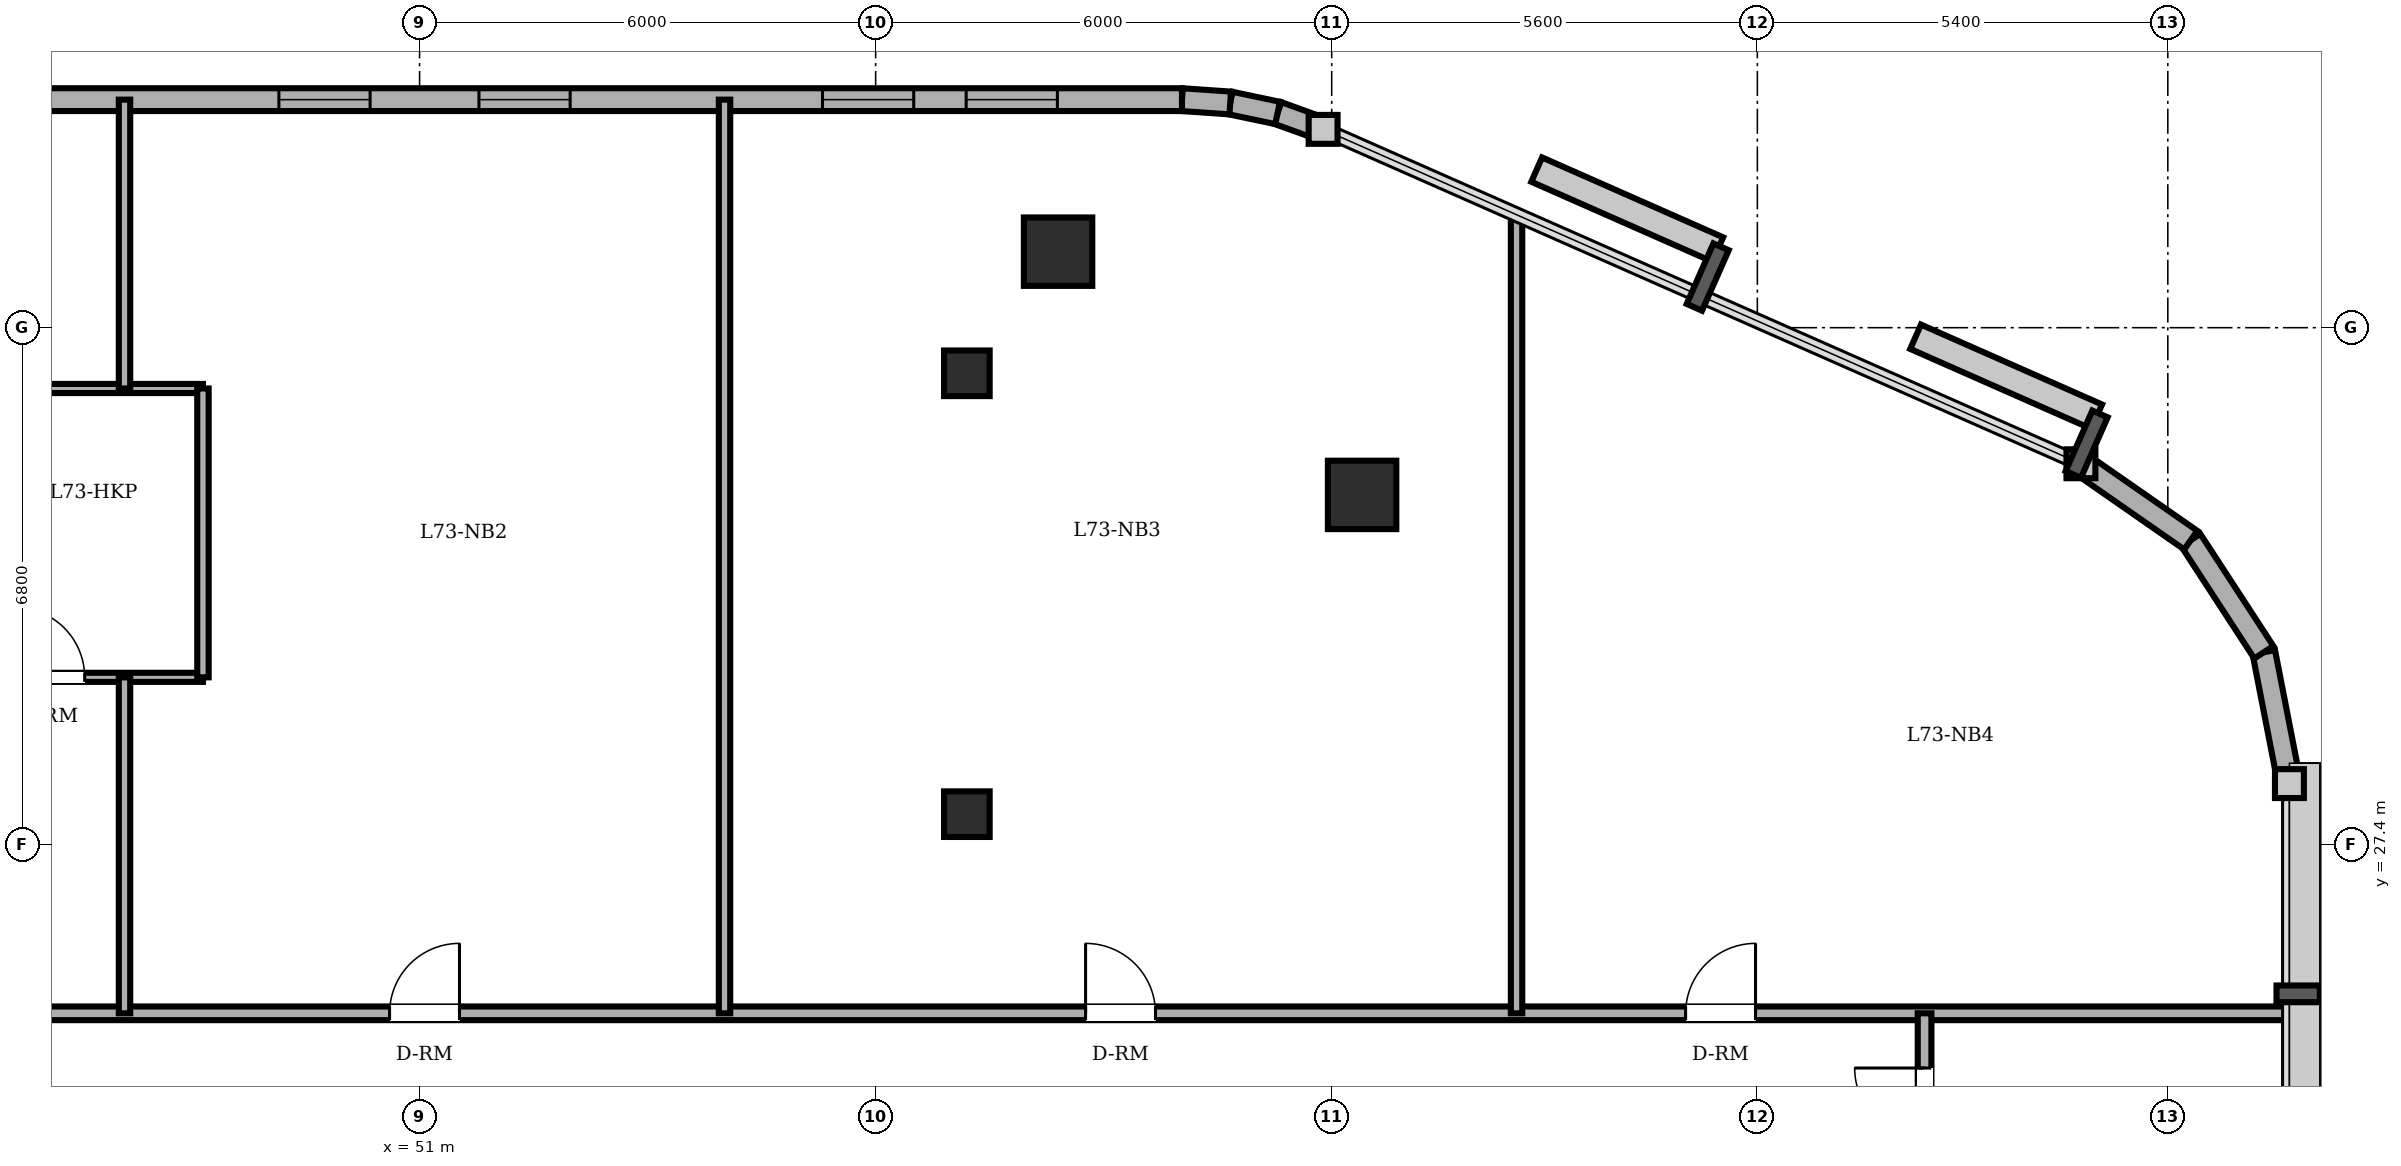
"""IFC4 building model, lengths in metres.
Left out: names, types, materials, properties, quantities, classifications, styles, units other than length and angle.
Written with IfcOpenShell. Run it as: python <this file> out.ifc"""

import sys

from ifc_helpers import new_model, si_unit, direction, frame, frame_2d, origin, origin_2d, place, context, subcontext, project, spatial, rectangle, circle, extrude, element, fill, save


model = new_model("IFC4")
c1 = context("Model", 3, precision=1e-05, world=origin(), true_north=direction((0.0, 1.0)))
c2 = subcontext(c1, "Body", "Model", "MODEL_VIEW")
j1 = project(units=[si_unit("LENGTHUNIT", "METRE"), si_unit("PLANEANGLEUNIT", "RADIAN")], contexts=[c1])
p1 = place(None, origin())
s1 = spatial("IfcSite", under=j1, at=p1, CompositionType="ELEMENT")
p2 = place(p1, origin())
s2 = spatial("IfcBuilding", under=s1, at=p2, CompositionType="ELEMENT")
p3 = place(p2, frame((0.0, 0.0, 280.7)))
s3 = spatial("IfcBuildingStorey", under=s2, at=p3, CompositionType="ELEMENT", Elevation=280.7)
for number, where, z_axis, x_axis in (
    (1, (63.4, 32.0, 0.0), (0.0, 0.0, 1.0), (1.0, 0.0, 0.0)),
    (2, (59.4, 35.2, 0.0), (0.0, 0.0, 1.0), (1.0, 0.0, 0.0)),
):
    element("IfcColumn", number, at=place(p3, frame(where, z_axis=z_axis, x_axis=x_axis)), inside=s3, PredefinedType="COLUMN", context=c2, shape_type="SweptSolid", body=[
        extrude(circle(Radius=0.45, at=origin_2d()), origin(), (0.0, 0.0, 1.0), 3.65),
    ])
for number, where, z_axis, x_axis in (
    (3, (58.2, 27.8, 0.0), (0.0, 0.0, 1.0), (1.0, 0.0, 0.0)),
    (4, (58.2, 33.6, 0.0), (0.0, 0.0, 1.0), (1.0, 0.0, 0.0)),
):
    element("IfcColumn", number, at=place(p3, frame(where, z_axis=z_axis, x_axis=x_axis)), inside=s3, PredefinedType="COLUMN", context=c2, shape_type="SweptSolid", body=[
        extrude(rectangle(XDim=0.6, YDim=0.6, at=origin_2d()), origin(), (0.0, 0.0, 1.0), 3.65),
    ])
for number, where, z_axis, x_axis in (
    (5, (75.6, 28.202, 0.0), (0.0, 0.0, 1.0), (-0.192, 0.981, 0.0)),
    (6, (75.263, 29.93, 0.0), (0.0, 0.0, 1.0), (-0.546, 0.838, 0.0)),
):
    element("IfcWall", number, at=place(p3, frame(where, z_axis=z_axis, x_axis=x_axis)), inside=s3, PredefinedType="SOLIDWALL", context=c2, shape_type="SweptSolid", body=[
        extrude(rectangle(XDim=1.76, YDim=0.3, at=frame_2d((0.88, 0.0))), origin(), (0.0, 0.0, 1.0), 3.45),
    ])
p4 = place(p3, frame((74.302, 31.405, 0.0), z_axis=(0.0, 0.0, 1.0), x_axis=(-0.821006966142, 0.570918174124, 0.0)))
e7 = element("IfcWall", 7, at=p4, inside=s3, PredefinedType="SOLIDWALL", context=c2, shape_type="SweptSolid", body=[
    extrude(rectangle(XDim=1.76, YDim=0.3, at=frame_2d((0.88, 0.0))), origin(), (0.0, 0.0, 1.0), 3.45),
])
p5 = place(p3, frame((62.887, 36.809, 0.0), z_axis=(0.0, 0.0, 1.0), x_axis=(-0.94077491148, 0.339031806665, 0.0)))
e8 = element("IfcWall", 8, at=p5, inside=s3, PredefinedType="SOLIDWALL", context=c2, shape_type="SweptSolid", body=[
    extrude(rectangle(XDim=0.636, YDim=0.3, at=frame_2d((0.318, 0.0))), origin(), (0.0, 0.0, 1.0), 3.45),
])
p6 = place(p3, frame((62.288, 37.025, 0.0), z_axis=(0.0, 0.0, 1.0), x_axis=(-0.97857012251, 0.205913854149, 0.0)))
e9 = element("IfcWall", 9, at=p6, inside=s3, PredefinedType="SOLIDWALL", context=c2, shape_type="SweptSolid", body=[
    extrude(rectangle(XDim=0.637, YDim=0.3, at=frame_2d((0.318, 0.0))), origin(), (0.0, 0.0, 1.0), 3.45),
])
p7 = place(p3, frame((61.665, 37.156, 0.0), z_axis=(0.0, 0.0, 1.0), x_axis=(-0.997613959688, 0.069039028352, 0.0)))
e10 = element("IfcWall", 10, at=p7, inside=s3, PredefinedType="SOLIDWALL", context=c2, shape_type="SweptSolid", body=[
    extrude(rectangle(XDim=0.636, YDim=0.3, at=frame_2d((0.318, 0.0))), origin(), (0.0, 0.0, 1.0), 3.45),
])
p8 = place(p3, frame((61.03, 37.2, 0.0), z_axis=(0.0, 0.0, 1.0), x_axis=(-1.0, 0.0, 0.0)))
e11 = element("IfcWall", 11, at=p8, inside=s3, PredefinedType="SOLIDWALL", context=c2, shape_type="SweptSolid", body=[
    extrude(rectangle(XDim=37.03, YDim=0.3, at=frame_2d((18.515, 0.0))), origin(), (0.0, 0.0, 1.0), 3.45),
])
p9 = place(p8, frame((26.655, 0.0, 0.0)))
e12 = element("IfcOpeningElement", 12, at=p9, cuts=e11, PredefinedType="OPENING", context=c2, shape_type="SweptSolid", body=[
    extrude(rectangle(XDim=0.95, YDim=2.2, at=frame_2d((0.475, 1.1))), frame((0.0, 0.16, 0.0), z_axis=(0.0, -1.0, 0.0), x_axis=(1.0, 0.0, 0.0)), (0.0, 0.0, 1.0), 0.32),
])
p10 = place(p8, frame((1.639, 0.0, 0.85)))
e13 = element("IfcOpeningElement", 13, at=p10, cuts=e11, PredefinedType="OPENING", context=c2, shape_type="SweptSolid", body=[
    extrude(rectangle(XDim=1.2, YDim=1.6, at=frame_2d((0.6, 0.8))), frame((0.0, 0.16, 0.0), z_axis=(0.0, -1.0, 0.0), x_axis=(1.0, 0.0, 0.0)), (0.0, 0.0, 1.0), 0.32),
])
p11 = place(p8, frame((3.529, 0.0, 0.85)))
e14 = element("IfcOpeningElement", 14, at=p11, cuts=e11, PredefinedType="OPENING", context=c2, shape_type="SweptSolid", body=[
    extrude(rectangle(XDim=1.2, YDim=1.6, at=frame_2d((0.6, 0.8))), frame((0.0, 0.16, 0.0), z_axis=(0.0, -1.0, 0.0), x_axis=(1.0, 0.0, 0.0)), (0.0, 0.0, 1.0), 0.32),
])
p12 = place(p8, frame((8.049, 0.0, 0.85)))
e15 = element("IfcOpeningElement", 15, at=p12, cuts=e11, PredefinedType="OPENING", context=c2, shape_type="SweptSolid", body=[
    extrude(rectangle(XDim=1.2, YDim=1.6, at=frame_2d((0.6, 0.8))), frame((0.0, 0.16, 0.0), z_axis=(0.0, -1.0, 0.0), x_axis=(1.0, 0.0, 0.0)), (0.0, 0.0, 1.0), 0.32),
])
p13 = place(p8, frame((10.681, 0.0, 0.85)))
e16 = element("IfcOpeningElement", 16, at=p13, cuts=e11, PredefinedType="OPENING", context=c2, shape_type="SweptSolid", body=[
    extrude(rectangle(XDim=1.2, YDim=1.6, at=frame_2d((0.6, 0.8))), frame((0.0, 0.16, 0.0), z_axis=(0.0, -1.0, 0.0), x_axis=(1.0, 0.0, 0.0)), (0.0, 0.0, 1.0), 0.32),
])
p14 = place(p8, frame((15.101, 0.0, 0.85)))
e17 = element("IfcOpeningElement", 17, at=p14, cuts=e11, PredefinedType="OPENING", context=c2, shape_type="SweptSolid", body=[
    extrude(rectangle(XDim=1.2, YDim=1.6, at=frame_2d((0.6, 0.8))), frame((0.0, 0.16, 0.0), z_axis=(0.0, -1.0, 0.0), x_axis=(1.0, 0.0, 0.0)), (0.0, 0.0, 1.0), 0.32),
])
p15 = place(p8, frame((16.891, 0.0, 0.85)))
e18 = element("IfcOpeningElement", 18, at=p15, cuts=e11, PredefinedType="OPENING", context=c2, shape_type="SweptSolid", body=[
    extrude(rectangle(XDim=1.2, YDim=1.6, at=frame_2d((0.6, 0.8))), frame((0.0, 0.16, 0.0), z_axis=(0.0, -1.0, 0.0), x_axis=(1.0, 0.0, 0.0)), (0.0, 0.0, 1.0), 0.32),
])
p16 = place(p8, frame((24.48, 0.0, 0.85)))
e19 = element("IfcOpeningElement", 19, at=p16, cuts=e11, PredefinedType="OPENING", context=c2, shape_type="SweptSolid", body=[
    extrude(rectangle(XDim=1.2, YDim=1.6, at=frame_2d((0.6, 0.8))), frame((0.0, 0.16, 0.0), z_axis=(0.0, -1.0, 0.0), x_axis=(1.0, 0.0, 0.0)), (0.0, 0.0, 1.0), 0.32),
])
p17 = place(p8, frame((30.28, 0.0, 0.85)))
e20 = element("IfcOpeningElement", 20, at=p17, cuts=e11, PredefinedType="OPENING", context=c2, shape_type="SweptSolid", body=[
    extrude(rectangle(XDim=1.2, YDim=1.6, at=frame_2d((0.6, 0.8))), frame((0.0, 0.16, 0.0), z_axis=(0.0, -1.0, 0.0), x_axis=(1.0, 0.0, 0.0)), (0.0, 0.0, 1.0), 0.32),
])
p18 = place(p3, frame((41.75, 25.18, 0.0), z_axis=(0.0, 0.0, 1.0), x_axis=(1.0, 0.0, 0.0)))
e21 = element("IfcWall", 21, at=p18, inside=s3, PredefinedType="PARTITIONING", context=c2, shape_type="SweptSolid", body=[
    extrude(rectangle(XDim=33.85, YDim=0.18, at=frame_2d((16.925, 0.0))), origin(), (0.0, 0.0, 1.0), 3.45),
])
p19 = place(p18, frame((2.484, 0.0, 0.0)))
e22 = element("IfcOpeningElement", 22, at=p19, cuts=e21, PredefinedType="OPENING", context=c2, shape_type="SweptSolid", body=[
    extrude(rectangle(XDim=0.92, YDim=2.1, at=frame_2d((0.46, 1.05))), frame((0.0, 0.1, 0.0), z_axis=(0.0, -1.0, 0.0), x_axis=(1.0, 0.0, 0.0)), (0.0, 0.0, 1.0), 0.2),
])
p20 = place(p18, frame((8.855, 0.0, 0.0)))
e23 = element("IfcOpeningElement", 23, at=p20, cuts=e21, PredefinedType="OPENING", context=c2, shape_type="SweptSolid", body=[
    extrude(rectangle(XDim=0.92, YDim=2.1, at=frame_2d((0.46, 1.05))), frame((0.0, 0.1, 0.0), z_axis=(0.0, -1.0, 0.0), x_axis=(1.0, 0.0, 0.0)), (0.0, 0.0, 1.0), 0.2),
])
p21 = place(p18, frame((18.012, 0.0, 0.0)))
e24 = element("IfcOpeningElement", 24, at=p21, cuts=e21, PredefinedType="OPENING", context=c2, shape_type="SweptSolid", body=[
    extrude(rectangle(XDim=0.92, YDim=2.1, at=frame_2d((0.46, 1.05))), frame((0.0, 0.1, 0.0), z_axis=(0.0, -1.0, 0.0), x_axis=(1.0, 0.0, 0.0)), (0.0, 0.0, 1.0), 0.2),
])
p22 = place(p18, frame((25.906, 0.0, 0.0)))
e25 = element("IfcOpeningElement", 25, at=p22, cuts=e21, PredefinedType="OPENING", context=c2, shape_type="SweptSolid", body=[
    extrude(rectangle(XDim=0.92, YDim=2.1, at=frame_2d((0.46, 1.05))), frame((0.0, 0.1, 0.0), z_axis=(0.0, -1.0, 0.0), x_axis=(1.0, 0.0, 0.0)), (0.0, 0.0, 1.0), 0.2),
])
p23 = place(p3, frame((41.75, 29.6, 0.0), z_axis=(0.0, 0.0, 1.0), x_axis=(1.0, 0.0, 0.0)))
e26 = element("IfcWall", 26, at=p23, inside=s3, PredefinedType="PARTITIONING", context=c2, shape_type="SweptSolid", body=[
    extrude(rectangle(XDim=6.4, YDim=0.12, at=frame_2d((3.2, 0.0))), origin(), (0.0, 0.0, 1.0), 3.132),
])
p24 = place(p23, frame((3.924, 0.0, 0.0)))
e27 = element("IfcOpeningElement", 27, at=p24, cuts=e26, PredefinedType="OPENING", context=c2, shape_type="SweptSolid", body=[
    extrude(rectangle(XDim=0.92, YDim=2.1, at=frame_2d((0.46, 1.05))), frame((0.0, 0.07, 0.0), z_axis=(0.0, -1.0, 0.0), x_axis=(1.0, 0.0, 0.0)), (0.0, 0.0, 1.0), 0.14),
])
p25 = place(p3, frame((41.75, 33.4, 0.0), z_axis=(0.0, 0.0, 1.0), x_axis=(1.0, 0.0, 0.0)))
e28 = element("IfcWall", 28, at=p25, inside=s3, PredefinedType="PARTITIONING", context=c2, shape_type="SweptSolid", body=[
    extrude(rectangle(XDim=6.4, YDim=0.12, at=frame_2d((3.2, 0.0))), origin(), (0.0, 0.0, 1.0), 3.092),
])
p26 = place(p3, frame((47.118, 25.18, 0.0), z_axis=(0.0, 0.0, 1.0), x_axis=(0.0, 1.0, 0.0)))
e29 = element("IfcWall", 29, at=p26, inside=s3, PredefinedType="PARTITIONING", context=c2, shape_type="SweptSolid", body=[
    extrude(rectangle(XDim=4.42, YDim=0.15, at=frame_2d((2.21, 0.0))), origin(), (0.0, 0.0, 1.0), 3.45),
])
p27 = place(p3, frame((47.118, 33.4, 0.0), z_axis=(0.0, 0.0, 1.0), x_axis=(0.0, 1.0, 0.0)))
e30 = element("IfcWall", 30, at=p27, inside=s3, PredefinedType="PARTITIONING", context=c2, shape_type="SweptSolid", body=[
    extrude(rectangle(XDim=3.8, YDim=0.15, at=frame_2d((1.9, 0.0))), origin(), (0.0, 0.0, 1.0), 3.45),
])
p28 = place(p3, frame((48.15, 29.6, 0.0), z_axis=(0.0, 0.0, 1.0), x_axis=(0.0, 1.0, 0.0)))
e31 = element("IfcWall", 31, at=p28, inside=s3, PredefinedType="PARTITIONING", context=c2, shape_type="SweptSolid", body=[
    extrude(rectangle(XDim=3.8, YDim=0.15, at=frame_2d((1.9, 0.0))), origin(), (0.0, 0.0, 1.0), 3.45),
])
p29 = place(p3, frame((55.012, 25.18, 0.0), z_axis=(0.0, 0.0, 1.0), x_axis=(0.0, 1.0, 0.0)))
e32 = element("IfcWall", 32, at=p29, inside=s3, PredefinedType="PARTITIONING", context=c2, shape_type="SweptSolid", body=[
    extrude(rectangle(XDim=12.02, YDim=0.15, at=frame_2d((6.01, 0.0))), origin(), (0.0, 0.0, 1.0), 3.45),
])
p30 = place(p3, frame((65.432, 25.18, 0.0), z_axis=(0.0, 0.0, 1.0), x_axis=(0.0, 1.0, 0.0)))
e33 = element("IfcWall", 33, at=p30, inside=s3, PredefinedType="PARTITIONING", context=c2, shape_type="SweptSolid", body=[
    extrude(rectangle(XDim=10.506, YDim=0.15, at=frame_2d((5.253, 0.0))), origin(), (0.0, 0.0, 1.0), 3.45),
])
p31 = place(p3, frame((70.8, 22.82, 0.0), z_axis=(0.0, 0.0, 1.0), x_axis=(0.0, 1.0, 0.0)))
e34 = element("IfcWall", 34, at=p31, inside=s3, PredefinedType="PARTITIONING", context=c2, shape_type="SweptSolid", body=[
    extrude(rectangle(XDim=2.36, YDim=0.18, at=frame_2d((1.18, 0.0))), origin(), (0.0, 0.0, 1.0), 3.45),
])
p32 = place(p31, frame((0.72, 0.0, 0.0)))
e35 = element("IfcOpeningElement", 35, at=p32, cuts=e34, PredefinedType="OPENING", context=c2, shape_type="SweptSolid", body=[
    extrude(rectangle(XDim=0.92, YDim=2.1, at=frame_2d((0.46, 1.05))), frame((0.0, 0.1, 0.0), z_axis=(0.0, -1.0, 0.0), x_axis=(1.0, 0.0, 0.0)), (0.0, 0.0, 1.0), 0.2),
])
p33 = place(p10, origin())
e36 = element("IfcWindow", 36, at=p33, inside=s3, PartitioningType="SINGLE_PANEL", PredefinedType="WINDOW", context=c2, shape_type="SweptSolid", body=[
    extrude(rectangle(XDim=1.2, YDim=1.6, at=frame_2d((0.6, 0.8))), frame((0.0, 0.03, 0.0), z_axis=(0.0, -1.0, 0.0), x_axis=(1.0, 0.0, 0.0)), (0.0, 0.0, 1.0), 0.06),
])
fill(e13, e36)
p34 = place(p11, origin())
e37 = element("IfcWindow", 37, at=p34, inside=s3, PartitioningType="SINGLE_PANEL", PredefinedType="WINDOW", context=c2, shape_type="SweptSolid", body=[
    extrude(rectangle(XDim=1.2, YDim=1.6, at=frame_2d((0.6, 0.8))), frame((0.0, 0.03, 0.0), z_axis=(0.0, -1.0, 0.0), x_axis=(1.0, 0.0, 0.0)), (0.0, 0.0, 1.0), 0.06),
])
fill(e14, e37)
p35 = place(p12, origin())
e38 = element("IfcWindow", 38, at=p35, inside=s3, PartitioningType="SINGLE_PANEL", PredefinedType="WINDOW", context=c2, shape_type="SweptSolid", body=[
    extrude(rectangle(XDim=1.2, YDim=1.6, at=frame_2d((0.6, 0.8))), frame((0.0, 0.03, 0.0), z_axis=(0.0, -1.0, 0.0), x_axis=(1.0, 0.0, 0.0)), (0.0, 0.0, 1.0), 0.06),
])
fill(e15, e38)
p36 = place(p13, origin())
e39 = element("IfcWindow", 39, at=p36, inside=s3, PartitioningType="SINGLE_PANEL", PredefinedType="WINDOW", context=c2, shape_type="SweptSolid", body=[
    extrude(rectangle(XDim=1.2, YDim=1.6, at=frame_2d((0.6, 0.8))), frame((0.0, 0.03, 0.0), z_axis=(0.0, -1.0, 0.0), x_axis=(1.0, 0.0, 0.0)), (0.0, 0.0, 1.0), 0.06),
])
fill(e16, e39)
p37 = place(p20, origin())
e40 = element("IfcDoor", 40, at=p37, inside=s3, OperationType="SINGLE_SWING_RIGHT", PredefinedType="DOOR", context=c2, shape_type="SweptSolid", body=[
    extrude(rectangle(XDim=0.92, YDim=2.1, at=frame_2d((0.46, 1.05))), frame((0.0, 0.025, 0.0), z_axis=(0.0, -1.0, 0.0), x_axis=(1.0, 0.0, 0.0)), (0.0, 0.0, 1.0), 0.05),
])
fill(e23, e40)
p38 = place(p21, origin())
e41 = element("IfcDoor", 41, at=p38, inside=s3, OperationType="SINGLE_SWING_LEFT", PredefinedType="DOOR", context=c2, shape_type="SweptSolid", body=[
    extrude(rectangle(XDim=0.92, YDim=2.1, at=frame_2d((0.46, 1.05))), frame((0.0, 0.025, 0.0), z_axis=(0.0, -1.0, 0.0), x_axis=(1.0, 0.0, 0.0)), (0.0, 0.0, 1.0), 0.05),
])
fill(e24, e41)
p39 = place(p22, origin())
e42 = element("IfcDoor", 42, at=p39, inside=s3, OperationType="SINGLE_SWING_RIGHT", PredefinedType="DOOR", context=c2, shape_type="SweptSolid", body=[
    extrude(rectangle(XDim=0.92, YDim=2.1, at=frame_2d((0.46, 1.05))), frame((0.0, 0.025, 0.0), z_axis=(0.0, -1.0, 0.0), x_axis=(1.0, 0.0, 0.0)), (0.0, 0.0, 1.0), 0.05),
])
fill(e25, e42)
p40 = place(p32, origin())
e43 = element("IfcDoor", 43, at=p40, inside=s3, OperationType="SINGLE_SWING_RIGHT", PredefinedType="DOOR", context=c2, shape_type="SweptSolid", body=[
    extrude(rectangle(XDim=0.92, YDim=2.1, at=frame_2d((0.46, 1.05))), frame((0.0, 0.025, 0.0), z_axis=(0.0, -1.0, 0.0), x_axis=(1.0, 0.0, 0.0)), (0.0, 0.0, 1.0), 0.05),
])
fill(e35, e43)
p41 = place(p24, origin())
e44 = element("IfcDoor", 44, at=p41, inside=s3, OperationType="SINGLE_SWING_LEFT", PredefinedType="DOOR", context=c2, shape_type="SweptSolid", body=[
    extrude(rectangle(XDim=0.92, YDim=2.1, at=frame_2d((0.46, 1.05))), frame((0.0, 0.025, 0.0), z_axis=(0.0, -1.0, 0.0), x_axis=(1.0, 0.0, 0.0)), (0.0, 0.0, 1.0), 0.05),
])
fill(e27, e44)
save(model, sys.argv[1])
